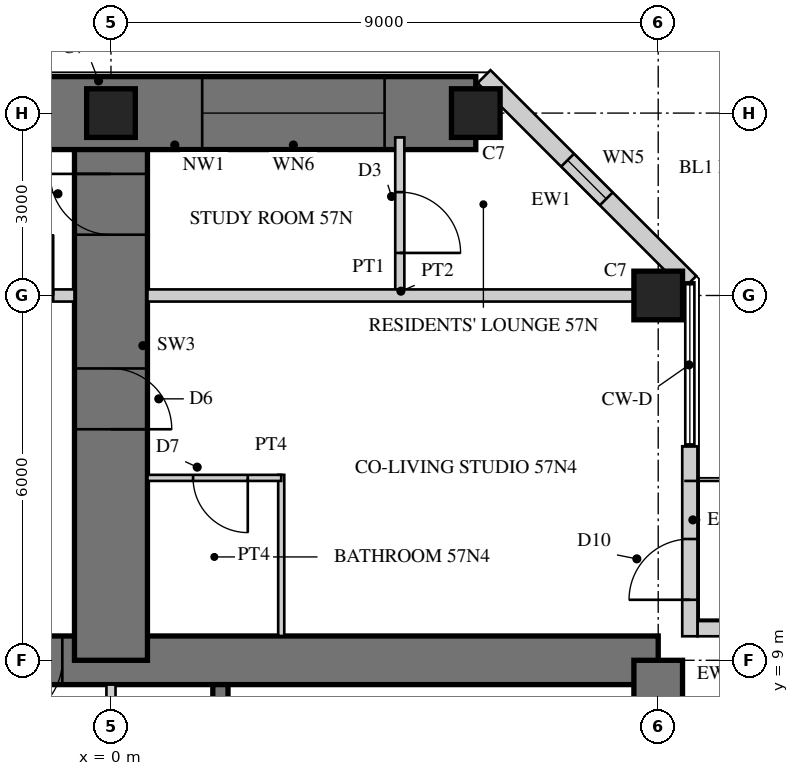
"""IFC4 building model, lengths in metres.
Left out: names, types, materials, properties, quantities, classifications, styles, units other than length and angle.
Written with IfcOpenShell. Run it as: python <this file> out.ifc"""

import sys

from ifc_helpers import new_model, si_unit, direction, frame, frame_2d, origin, origin_2d, place, context, subcontext, project, spatial, rectangle, hollow_rectangle, extrude, element, fill, save


model = new_model("IFC4")
c1 = context("Model", 3, precision=1e-05, world=origin(), true_north=direction((0.0, 1.0)))
c2 = subcontext(c1, "Body", "Model", "MODEL_VIEW")
j1 = project(units=[si_unit("LENGTHUNIT", "METRE"), si_unit("PLANEANGLEUNIT", "RADIAN")], contexts=[c1])
p1 = place(None, origin())
s1 = spatial("IfcSite", under=j1, at=p1, CompositionType="ELEMENT")
p2 = place(p1, origin())
s2 = spatial("IfcBuilding", under=s1, at=p2, CompositionType="ELEMENT")
p3 = place(p2, frame((0.0, 0.0, 225.5)))
s3 = spatial("IfcBuildingStorey", under=s2, at=p3, CompositionType="ELEMENT", Elevation=225.5)
p4 = place(p3, frame((9.0, 9.0, 0.0), z_axis=(0.0, 0.0, 1.0), x_axis=(-1.0, 0.0, 0.0)))
e1 = element("IfcWall", 1, at=p4, inside=s3, PredefinedType="SHEAR", context=c2, shape_type="SweptSolid", body=[
    extrude(rectangle(XDim=18.0, YDim=0.8, at=frame_2d((9.0, 0.0))), origin(), (0.0, 0.0, 1.0), 3.4),
])
p5 = place(p4, frame((9.8, 0.0, 0.0)))
e2 = element("IfcOpeningElement", 2, at=p5, cuts=e1, PredefinedType="OPENING", context=c2, shape_type="SweptSolid", body=[
    extrude(rectangle(XDim=1.0, YDim=2.4, at=frame_2d((0.5, 1.2))), frame((0.0, 0.41, 0.0), z_axis=(0.0, -1.0, 0.0), x_axis=(1.0, 0.0, 0.0)), (0.0, 0.0, 1.0), 0.82),
])
p6 = place(p3, frame((9.0, -9.0, 0.0), z_axis=(0.0, 0.0, 1.0), x_axis=(0.0, 1.0, 0.0)))
e3 = element("IfcWall", 3, at=p6, inside=s3, PredefinedType="SHEAR", context=c2, shape_type="SweptSolid", body=[
    extrude(rectangle(XDim=18.0, YDim=0.8, at=frame_2d((9.0, 0.0))), origin(), (0.0, 0.0, 1.0), 3.4),
])
p7 = place(p6, frame((9.8, 0.0, 0.0)))
e4 = element("IfcOpeningElement", 4, at=p7, cuts=e3, PredefinedType="OPENING", context=c2, shape_type="SweptSolid", body=[
    extrude(rectangle(XDim=1.0, YDim=2.4, at=frame_2d((0.5, 1.2))), frame((0.0, 0.41, 0.0), z_axis=(0.0, -1.0, 0.0), x_axis=(1.0, 0.0, 0.0)), (0.0, 0.0, 1.0), 0.82),
])
p8 = place(p3, frame((1.8, 1.875, 0.0), z_axis=(0.0, 0.0, 1.0), x_axis=(0.0, 1.0, 0.0)))
e5 = element("IfcWall", 5, at=p8, inside=s3, PredefinedType="SHEAR", context=c2, shape_type="SweptSolid", body=[
    extrude(rectangle(XDim=6.725, YDim=0.25, at=frame_2d((3.363, 0.0))), origin(), (0.0, 0.0, 1.0), 3.4),
])
p9 = place(p8, frame((1.875, 0.0, 0.0)))
e6 = element("IfcOpeningElement", 6, at=p9, cuts=e5, PredefinedType="OPENING", context=c2, shape_type="SweptSolid", body=[
    extrude(rectangle(XDim=1.6, YDim=2.4, at=frame_2d((0.8, 1.2))), frame((0.0, 0.135, 0.0), z_axis=(0.0, -1.0, 0.0), x_axis=(1.0, 0.0, 0.0)), (0.0, 0.0, 1.0), 0.27),
])
p10 = place(p3, frame((0.0, 9.0, 0.0), z_axis=(0.0, 0.0, 1.0), x_axis=(0.0, 1.0, 0.0)))
e7 = element("IfcWall", 7, at=p10, inside=s3, PredefinedType="SHEAR", context=c2, shape_type="SweptSolid", body=[
    extrude(rectangle(XDim=9.0, YDim=1.2, at=frame_2d((4.5, 0.0))), origin(), (0.0, 0.0, 1.0), 3.4),
])
p11 = place(p10, frame((3.8, 0.0, 0.0)))
e8 = element("IfcOpeningElement", 8, at=p11, cuts=e7, PredefinedType="OPENING", context=c2, shape_type="SweptSolid", body=[
    extrude(rectangle(XDim=1.0, YDim=2.15, at=frame_2d((0.5, 1.075))), frame((0.0, 0.61, 0.0), z_axis=(0.0, -1.0, 0.0), x_axis=(1.0, 0.0, 0.0)), (0.0, 0.0, 1.0), 1.22),
])
p12 = place(p10, frame((7.0, 0.0, 0.0)))
e9 = element("IfcOpeningElement", 9, at=p12, cuts=e7, PredefinedType="OPENING", context=c2, shape_type="SweptSolid", body=[
    extrude(rectangle(XDim=1.0, YDim=2.2, at=frame_2d((0.5, 1.1))), frame((0.0, 0.61, 0.0), z_axis=(0.0, -1.0, 0.0), x_axis=(1.0, 0.0, 0.0)), (0.0, 0.0, 1.0), 1.22),
])
p13 = place(p3, frame((6.0, 18.0, 0.0), z_axis=(0.0, 0.0, 1.0), x_axis=(-1.0, 0.0, 0.0)))
e10 = element("IfcWall", 10, at=p13, inside=s3, PredefinedType="SHEAR", context=c2, shape_type="SweptSolid", body=[
    extrude(rectangle(XDim=12.0, YDim=1.2, at=frame_2d((6.0, 0.0))), origin(), (0.0, 0.0, 1.0), 3.4),
])
p14 = place(p13, frame((1.5, 0.0, 0.6)))
e11 = element("IfcOpeningElement", 11, at=p14, cuts=e10, PredefinedType="OPENING", context=c2, shape_type="SweptSolid", body=[
    extrude(rectangle(XDim=3.0, YDim=2.4, at=frame_2d((1.5, 1.2))), frame((0.0, 0.61, 0.0), z_axis=(0.0, -1.0, 0.0), x_axis=(1.0, 0.0, 0.0)), (0.0, 0.0, 1.0), 1.22),
])
p15 = place(p13, frame((7.5, 0.0, 0.6)))
e12 = element("IfcOpeningElement", 12, at=p15, cuts=e10, PredefinedType="OPENING", context=c2, shape_type="SweptSolid", body=[
    extrude(rectangle(XDim=3.0, YDim=2.4, at=frame_2d((1.5, 1.2))), frame((0.0, 0.61, 0.0), z_axis=(0.0, -1.0, 0.0), x_axis=(1.0, 0.0, 0.0)), (0.0, 0.0, 1.0), 1.22),
])
for number, where, z_axis, x_axis in (
    (13, (9.0, 15.0, 0.0), (0.0, 0.0, 1.0), (1.0, 0.0, 0.0)),
    (14, (6.0, 18.0, 0.0), (0.0, 0.0, 1.0), (1.0, 0.0, 0.0)),
    (15, (0.0, 18.0, 0.0), (0.0, 0.0, 1.0), (1.0, 0.0, 0.0)),
):
    element("IfcColumn", number, at=place(p3, frame(where, z_axis=z_axis, x_axis=x_axis)), inside=s3, PredefinedType="COLUMN", context=c2, shape_type="SweptSolid", body=[
        extrude(rectangle(XDim=0.8, YDim=0.8, at=origin_2d()), origin(), (0.0, 0.0, 1.0), 3.4),
    ])
p16 = place(p3, frame((12.52, 9.52, 0.0), z_axis=(0.0, 0.0, 1.0), x_axis=(-1.0, 0.0, 0.0)))
e16 = element("IfcWall", 16, at=p16, inside=s3, PredefinedType="SOLIDWALL", context=c2, shape_type="SweptSolid", body=[
    extrude(rectangle(XDim=2.875, YDim=0.25, at=frame_2d((1.438, 0.0))), origin(), (0.0, 0.0, 1.0), 3.22),
])
p17 = place(p16, frame((0.6, 0.0, 0.0)))
e17 = element("IfcOpeningElement", 17, at=p17, cuts=e16, PredefinedType="OPENING", context=c2, shape_type="SweptSolid", body=[
    extrude(rectangle(XDim=1.0, YDim=2.2, at=frame_2d((0.5, 1.1))), frame((0.0, 0.135, 0.0), z_axis=(0.0, -1.0, 0.0), x_axis=(1.0, 0.0, 0.0)), (0.0, 0.0, 1.0), 0.27),
])
p18 = place(p3, frame((9.52, 9.395, 0.0), z_axis=(0.0, 0.0, 1.0), x_axis=(0.0, 1.0, 0.0)))
e18 = element("IfcWall", 18, at=p18, inside=s3, PredefinedType="SOLIDWALL", context=c2, shape_type="SweptSolid", body=[
    extrude(rectangle(XDim=3.125, YDim=0.25, at=frame_2d((1.562, 0.0))), origin(), (0.0, 0.0, 1.0), 3.22),
])
p19 = place(p18, frame((0.6, 0.0, 0.0)))
e19 = element("IfcOpeningElement", 19, at=p19, cuts=e18, PredefinedType="OPENING", context=c2, shape_type="SweptSolid", body=[
    extrude(rectangle(XDim=1.0, YDim=2.2, at=frame_2d((0.5, 1.1))), frame((0.0, 0.135, 0.0), z_axis=(0.0, -1.0, 0.0), x_axis=(1.0, 0.0, 0.0)), (0.0, 0.0, 1.0), 0.27),
])
p20 = place(p3, frame((9.52, 15.215, 0.0), z_axis=(0.0, 0.0, 1.0), x_axis=(-0.707081278264, 0.707132283189, 0.0)))
e20 = element("IfcWall", 20, at=p20, inside=s3, PredefinedType="SOLIDWALL", context=c2, shape_type="SweptSolid", body=[
    extrude(rectangle(XDim=4.787, YDim=0.3, at=frame_2d((2.393, 0.0))), origin(), (0.0, 0.0, 1.0), 3.22),
])
p21 = place(p20, frame((1.943, 0.0, 0.3)))
e21 = element("IfcOpeningElement", 21, at=p21, cuts=e20, PredefinedType="OPENING", context=c2, shape_type="SweptSolid", body=[
    extrude(rectangle(XDim=0.9, YDim=2.4, at=frame_2d((0.45, 1.2))), frame((0.0, 0.16, 0.0), z_axis=(0.0, -1.0, 0.0), x_axis=(1.0, 0.0, 0.0)), (0.0, 0.0, 1.0), 0.32),
])
p22 = place(p3, frame((0.0, 5.675, 0.0), z_axis=(0.0, 0.0, 1.0), x_axis=(0.0, 1.0, 0.0)))
e22 = element("IfcWall", 22, at=p22, inside=s3, PredefinedType="PARTITIONING", context=c2, shape_type="SweptSolid", body=[
    extrude(rectangle(XDim=2.925, YDim=0.15, at=frame_2d((1.462, 0.0))), origin(), (0.0, 0.0, 1.0), 3.22),
])
p23 = place(p22, frame((0.4, 0.0, 0.0)))
e23 = element("IfcOpeningElement", 23, at=p23, cuts=e22, PredefinedType="OPENING", context=c2, shape_type="SweptSolid", body=[
    extrude(rectangle(XDim=1.0, YDim=2.1, at=frame_2d((0.5, 1.05))), frame((0.0, 0.085, 0.0), z_axis=(0.0, -1.0, 0.0), x_axis=(1.0, 0.0, 0.0)), (0.0, 0.0, 1.0), 0.17),
])
p24 = place(p3, frame((2.8, 9.4, 0.0), z_axis=(0.0, 0.0, 1.0), x_axis=(0.0, 1.0, 0.0)))
e24 = element("IfcWall", 24, at=p24, inside=s3, PredefinedType="PARTITIONING", context=c2, shape_type="SweptSolid", body=[
    extrude(rectangle(XDim=2.65, YDim=0.1, at=frame_2d((1.325, 0.0))), origin(), (0.0, 0.0, 1.0), 3.22),
])
p25 = place(p3, frame((2.8, 12.0, 0.0), z_axis=(0.0, 0.0, 1.0), x_axis=(-1.0, 0.0, 0.0)))
e25 = element("IfcWall", 25, at=p25, inside=s3, PredefinedType="PARTITIONING", context=c2, shape_type="SweptSolid", body=[
    extrude(rectangle(XDim=2.2, YDim=0.1, at=frame_2d((1.1, 0.0))), origin(), (0.0, 0.0, 1.0), 3.22),
])
p26 = place(p25, frame((0.55, 0.0, 0.0)))
e26 = element("IfcOpeningElement", 26, at=p26, cuts=e25, PredefinedType="OPENING", context=c2, shape_type="SweptSolid", body=[
    extrude(rectangle(XDim=0.9, YDim=2.1, at=frame_2d((0.45, 1.05))), frame((0.0, 0.06, 0.0), z_axis=(0.0, -1.0, 0.0), x_axis=(1.0, 0.0, 0.0)), (0.0, 0.0, 1.0), 0.12),
])
p27 = place(p3, frame((4.75, 15.1, 0.0), z_axis=(0.0, 0.0, 1.0), x_axis=(0.0, 1.0, 0.0)))
e27 = element("IfcWall", 27, at=p27, inside=s3, PredefinedType="PARTITIONING", context=c2, shape_type="SweptSolid", body=[
    extrude(rectangle(XDim=2.5, YDim=0.15, at=frame_2d((1.25, 0.0))), origin(), (0.0, 0.0, 1.0), 3.22),
])
p28 = place(p27, frame((0.6, 0.0, 0.0)))
e28 = element("IfcOpeningElement", 28, at=p28, cuts=e27, PredefinedType="OPENING", context=c2, shape_type="SweptSolid", body=[
    extrude(rectangle(XDim=1.0, YDim=2.1, at=frame_2d((0.5, 1.05))), frame((0.0, 0.085, 0.0), z_axis=(0.0, -1.0, 0.0), x_axis=(1.0, 0.0, 0.0)), (0.0, 0.0, 1.0), 0.17),
])
p29 = place(p3, frame((8.6, 15.0, 0.0), z_axis=(0.0, 0.0, 1.0), x_axis=(-1.0, 0.0, 0.0)))
e29 = element("IfcWall", 29, at=p29, inside=s3, PredefinedType="SOLIDWALL", context=c2, shape_type="SweptSolid", body=[
    extrude(rectangle(XDim=8.0, YDim=0.2, at=frame_2d((4.0, 0.0))), origin(), (0.0, 0.0, 1.0), 2.52),
])
p30 = place(p3, frame((-0.6, 15.0, 0.0), z_axis=(0.0, 0.0, 1.0), x_axis=(-1.0, 0.0, 0.0)))
e30 = element("IfcWall", 30, at=p30, inside=s3, PredefinedType="SOLIDWALL", context=c2, shape_type="SweptSolid", body=[
    extrude(rectangle(XDim=8.0, YDim=0.2, at=frame_2d((4.0, 0.0))), origin(), (0.0, 0.0, 1.0), 2.52),
])
p31 = place(p30, frame((0.35, 0.0, 0.0)))
e31 = element("IfcOpeningElement", 31, at=p31, cuts=e30, PredefinedType="OPENING", context=c2, shape_type="SweptSolid", body=[
    extrude(rectangle(XDim=1.0, YDim=2.2, at=frame_2d((0.5, 1.1))), frame((0.0, 0.11, 0.0), z_axis=(0.0, -1.0, 0.0), x_axis=(1.0, 0.0, 0.0)), (0.0, 0.0, 1.0), 0.22),
])
p32 = place(p19, origin())
e32 = element("IfcDoor", 32, at=p32, inside=s3, OperationType="SINGLE_SWING_LEFT", PredefinedType="DOOR", context=c2, shape_type="SweptSolid", body=[
    extrude(hollow_rectangle(XDim=1.0, YDim=2.2, WallThickness=0.06, at=frame_2d((0.5, 1.1))), frame((0.0, 0.025, 0.0), z_axis=(0.0, -1.0, 0.0), x_axis=(1.0, 0.0, 0.0)), (0.0, 0.0, 1.0), 0.05),
    extrude(rectangle(XDim=0.879, YDim=2.079, at=frame_2d((0.5, 1.1))), frame((0.0, 0.025, 0.0), z_axis=(0.0, -1.0, 0.0), x_axis=(1.0, 0.0, 0.0)), (0.0, 0.0, 1.0), 0.05),
])
fill(e19, e32)
p33 = place(p21, origin())
e33 = element("IfcWindow", 33, at=p33, inside=s3, PartitioningType="SINGLE_PANEL", PredefinedType="WINDOW", context=c2, shape_type="SweptSolid", body=[
    extrude(hollow_rectangle(XDim=0.9, YDim=2.4, WallThickness=0.06, at=frame_2d((0.45, 1.2))), frame((0.0, 0.03, 0.0), z_axis=(0.0, -1.0, 0.0), x_axis=(1.0, 0.0, 0.0)), (0.0, 0.0, 1.0), 0.06),
    extrude(rectangle(XDim=0.779, YDim=2.279, at=frame_2d((0.45, 1.2))), frame((0.0, 0.03, 0.0), z_axis=(0.0, -1.0, 0.0), x_axis=(1.0, 0.0, 0.0)), (0.0, 0.0, 1.0), 0.06),
])
fill(e21, e33)
p34 = place(p14, origin())
e34 = element("IfcWindow", 34, at=p34, inside=s3, PartitioningType="SINGLE_PANEL", PredefinedType="WINDOW", context=c2, shape_type="SweptSolid", body=[
    extrude(hollow_rectangle(XDim=3.0, YDim=2.4, WallThickness=0.06, at=frame_2d((1.5, 1.2))), frame((0.0, 0.03, 0.0), z_axis=(0.0, -1.0, 0.0), x_axis=(1.0, 0.0, 0.0)), (0.0, 0.0, 1.0), 0.06),
    extrude(rectangle(XDim=2.879, YDim=2.279, at=frame_2d((1.5, 1.2))), frame((0.0, 0.03, 0.0), z_axis=(0.0, -1.0, 0.0), x_axis=(1.0, 0.0, 0.0)), (0.0, 0.0, 1.0), 0.06),
])
fill(e11, e34)
p35 = place(p26, origin())
e35 = element("IfcDoor", 35, at=p35, inside=s3, OperationType="SINGLE_SWING_LEFT", PredefinedType="DOOR", context=c2, shape_type="SweptSolid", body=[
    extrude(rectangle(XDim=0.9, YDim=2.1, at=frame_2d((0.45, 1.05))), frame((0.0, 0.025, 0.0), z_axis=(0.0, -1.0, 0.0), x_axis=(1.0, 0.0, 0.0)), (0.0, 0.0, 1.0), 0.05),
])
fill(e26, e35)
p36 = place(p28, frame((1.0, 0.0, 0.0), z_axis=(0.0, 0.0, 1.0), x_axis=(-1.0, 0.0, 0.0)))
e36 = element("IfcDoor", 36, at=p36, inside=s3, OperationType="SINGLE_SWING_RIGHT", PredefinedType="DOOR", context=c2, shape_type="SweptSolid", body=[
    extrude(rectangle(XDim=1.0, YDim=2.1, at=frame_2d((0.5, 1.05))), frame((0.0, 0.025, 0.0), z_axis=(0.0, -1.0, 0.0), x_axis=(1.0, 0.0, 0.0)), (0.0, 0.0, 1.0), 0.05),
])
fill(e28, e36)
p37 = place(p31, frame((1.0, 0.0, 0.0), z_axis=(0.0, 0.0, 1.0), x_axis=(-1.0, 0.0, 0.0)))
e37 = element("IfcDoor", 37, at=p37, inside=s3, OperationType="SINGLE_SWING_RIGHT", PredefinedType="DOOR", context=c2, shape_type="SweptSolid", body=[
    extrude(rectangle(XDim=1.0, YDim=2.2, at=frame_2d((0.5, 1.1))), frame((0.0, 0.025, 0.0), z_axis=(0.0, -1.0, 0.0), x_axis=(1.0, 0.0, 0.0)), (0.0, 0.0, 1.0), 0.05),
])
fill(e31, e37)
p38 = place(p11, frame((1.0, 0.0, 0.0), z_axis=(0.0, 0.0, 1.0), x_axis=(-1.0, 0.0, 0.0)))
e38 = element("IfcDoor", 38, at=p38, inside=s3, OperationType="SINGLE_SWING_RIGHT", PredefinedType="DOOR", context=c2, shape_type="SweptSolid", body=[
    extrude(rectangle(XDim=1.0, YDim=2.15, at=frame_2d((0.5, 1.075))), frame((0.0, 0.025, 0.0), z_axis=(0.0, -1.0, 0.0), x_axis=(1.0, 0.0, 0.0)), (0.0, 0.0, 1.0), 0.05),
])
fill(e8, e38)
p39 = place(p12, origin())
e39 = element("IfcDoor", 39, at=p39, inside=s3, OperationType="SINGLE_SWING_RIGHT", PredefinedType="DOOR", context=c2, shape_type="SweptSolid", body=[
    extrude(rectangle(XDim=1.0, YDim=2.2, at=frame_2d((0.5, 1.1))), frame((0.0, 0.025, 0.0), z_axis=(0.0, -1.0, 0.0), x_axis=(1.0, 0.0, 0.0)), (0.0, 0.0, 1.0), 0.05),
])
fill(e9, e39)
p40 = place(p5, origin())
e40 = element("IfcDoor", 40, at=p40, inside=s3, OperationType="SINGLE_SWING_RIGHT", PredefinedType="DOOR", context=c2, shape_type="SweptSolid", body=[
    extrude(rectangle(XDim=1.0, YDim=2.4, at=frame_2d((0.5, 1.2))), frame((0.0, 0.055, 0.0), z_axis=(0.0, -1.0, 0.0), x_axis=(1.0, 0.0, 0.0)), (0.0, 0.0, 1.0), 0.05),
])
fill(e2, e40)
save(model, sys.argv[1])
